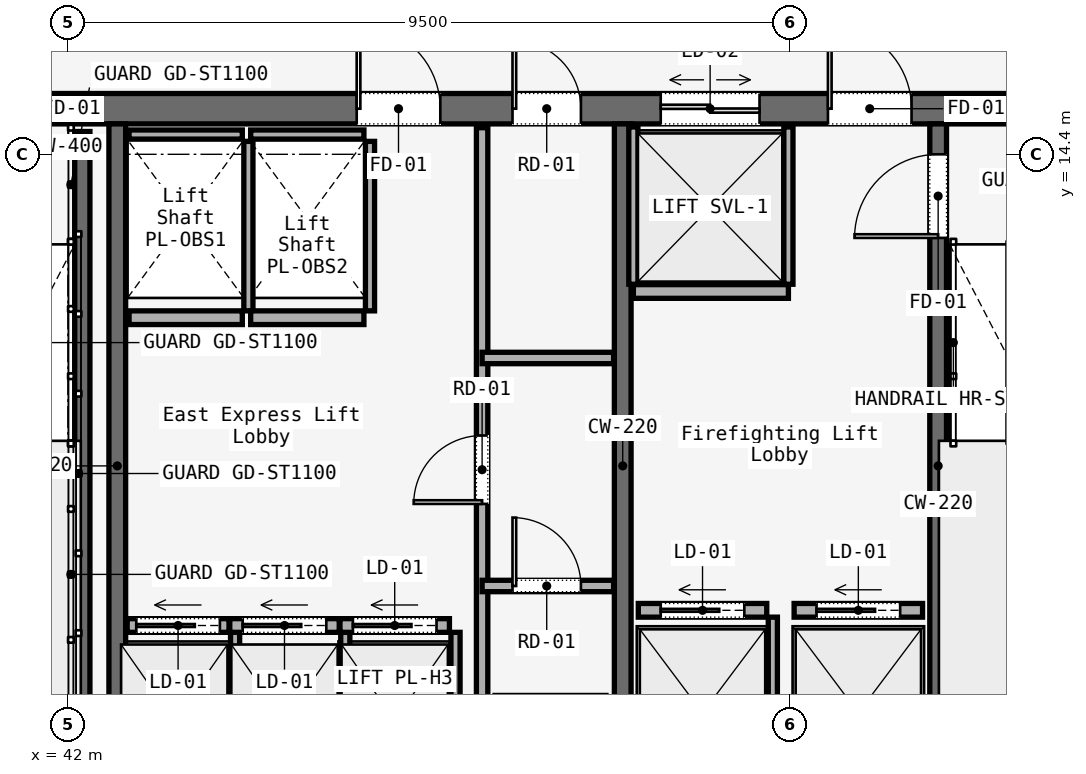
"""IFC4 building model, lengths in metres.
Left out: names, types, materials, properties, quantities, classifications, styles, units other than length and angle.
Written with IfcOpenShell. Run it as: python <this file> out.ifc"""

import sys

from ifc_helpers import new_model, si_unit, direction, frame, frame_2d, origin, place, context, subcontext, project, spatial, rectangle, extrude, element, fill, save


model = new_model("IFC4")
c1 = context("Model", 3, precision=1e-05, world=origin(), true_north=direction((0.0, 1.0)))
c2 = subcontext(c1, "Body", "Model", "MODEL_VIEW")
j1 = project(units=[si_unit("LENGTHUNIT", "METRE"), si_unit("PLANEANGLEUNIT", "RADIAN")], contexts=[c1])
p1 = place(None, origin())
s1 = spatial("IfcSite", under=j1, at=p1, CompositionType="ELEMENT")
p2 = place(p1, origin())
s2 = spatial("IfcBuilding", under=s1, at=p2, CompositionType="ELEMENT")
p3 = place(p2, frame((0.0, 0.0, 229.4)))
s3 = spatial("IfcBuildingStorey", under=s2, at=p3, CompositionType="ELEMENT", Elevation=229.4)
p4 = place(p3, frame((26.45, 15.0, 0.0), z_axis=(0.0, 0.0, 1.0), x_axis=(1.0, 0.0, 0.0)))
e1 = element("IfcWall", 1, at=p4, inside=s3, PredefinedType="SOLIDWALL", context=c2, shape_type="SweptSolid", body=[
    extrude(rectangle(XDim=31.1, YDim=0.4, at=frame_2d((15.55, 0.0))), origin(), (0.0, 0.0, 1.0), 3.58),
])
p5 = place(p4, frame((1.65, 0.0, 0.0)))
e2 = element("IfcOpeningElement", 2, at=p5, cuts=e1, PredefinedType="OPENING", context=c2, shape_type="SweptSolid", body=[
    extrude(rectangle(XDim=1.1, YDim=2.2, at=frame_2d((0.55, 1.1))), frame((0.0, 0.2, 0.0), z_axis=(0.0, -1.0, 0.0), x_axis=(1.0, 0.0, 0.0)), (0.0, 0.0, 1.0), 0.4),
])
p6 = place(p4, frame((13.65, 0.0, 0.0)))
e3 = element("IfcOpeningElement", 3, at=p6, cuts=e1, PredefinedType="OPENING", context=c2, shape_type="SweptSolid", body=[
    extrude(rectangle(XDim=1.1, YDim=2.2, at=frame_2d((0.55, 1.1))), frame((0.0, 0.2, 0.0), z_axis=(0.0, -1.0, 0.0), x_axis=(1.0, 0.0, 0.0)), (0.0, 0.0, 1.0), 0.4),
])
p7 = place(p4, frame((25.55, 0.0, 0.0)))
e4 = element("IfcOpeningElement", 4, at=p7, cuts=e1, PredefinedType="OPENING", context=c2, shape_type="SweptSolid", body=[
    extrude(rectangle(XDim=1.1, YDim=2.2, at=frame_2d((0.55, 1.1))), frame((0.0, 0.2, 0.0), z_axis=(0.0, -1.0, 0.0), x_axis=(1.0, 0.0, 0.0)), (0.0, 0.0, 1.0), 0.4),
])
p8 = place(p4, frame((19.35, 0.0, 0.0)))
e5 = element("IfcOpeningElement", 5, at=p8, cuts=e1, PredefinedType="OPENING", context=c2, shape_type="SweptSolid", body=[
    extrude(rectangle(XDim=1.1, YDim=2.2, at=frame_2d((0.55, 1.1))), frame((0.0, 0.2, 0.0), z_axis=(0.0, -1.0, 0.0), x_axis=(1.0, 0.0, 0.0)), (0.0, 0.0, 1.0), 0.4),
])
p9 = place(p4, frame((21.4, 0.0, 0.0)))
e6 = element("IfcOpeningElement", 6, at=p9, cuts=e1, PredefinedType="OPENING", context=c2, shape_type="SweptSolid", body=[
    extrude(rectangle(XDim=0.9, YDim=2.1, at=frame_2d((0.45, 1.05))), frame((0.0, 0.2, 0.0), z_axis=(0.0, -1.0, 0.0), x_axis=(1.0, 0.0, 0.0)), (0.0, 0.0, 1.0), 0.4),
])
p10 = place(p4, frame((5.54, 0.0, 0.0)))
e7 = element("IfcOpeningElement", 7, at=p10, cuts=e1, PredefinedType="OPENING", context=c2, shape_type="SweptSolid", body=[
    extrude(rectangle(XDim=0.95, YDim=2.2, at=frame_2d((0.475, 1.1))), frame((0.0, 0.2, 0.0), z_axis=(0.0, -1.0, 0.0), x_axis=(1.0, 0.0, 0.0)), (0.0, 0.0, 1.0), 0.4),
])
p11 = place(p4, frame((9.49, 0.0, 0.0)))
e8 = element("IfcOpeningElement", 8, at=p11, cuts=e1, PredefinedType="OPENING", context=c2, shape_type="SweptSolid", body=[
    extrude(rectangle(XDim=0.95, YDim=2.2, at=frame_2d((0.475, 1.1))), frame((0.0, 0.2, 0.0), z_axis=(0.0, -1.0, 0.0), x_axis=(1.0, 0.0, 0.0)), (0.0, 0.0, 1.0), 0.4),
])
p12 = place(p4, frame((23.35, 0.0, 0.0)))
e9 = element("IfcOpeningElement", 9, at=p12, cuts=e1, PredefinedType="OPENING", context=c2, shape_type="SweptSolid", body=[
    extrude(rectangle(XDim=1.3, YDim=2.3, at=frame_2d((0.65, 1.15))), frame((0.0, 0.2, 0.0), z_axis=(0.0, -1.0, 0.0), x_axis=(1.0, 0.0, 0.0)), (0.0, 0.0, 1.0), 0.4),
])
for number, where, z_axis, x_axis in (
    (10, (42.65, 5.8, 0.0), (0.0, 0.0, 1.0), (0.0, 1.0, 0.0)),
    (11, (49.3, 5.8, 0.0), (0.0, 0.0, 1.0), (0.0, 1.0, 0.0)),
):
    element("IfcWall", number, at=place(p3, frame(where, z_axis=z_axis, x_axis=x_axis)), inside=s3, PredefinedType="SOLIDWALL", context=c2, shape_type="SweptSolid", body=[
        extrude(rectangle(XDim=9.0, YDim=0.22, at=frame_2d((4.5, 0.0))), origin(), (0.0, 0.0, 1.0), 3.58),
    ])
p13 = place(p3, frame((53.45, 5.8, 0.0), z_axis=(0.0, 0.0, 1.0), x_axis=(0.0, 1.0, 0.0)))
e12 = element("IfcWall", 12, at=p13, inside=s3, PredefinedType="SOLIDWALL", context=c2, shape_type="SweptSolid", body=[
    extrude(rectangle(XDim=9.0, YDim=0.22, at=frame_2d((4.5, 0.0))), origin(), (0.0, 0.0, 1.0), 3.58),
])
p14 = place(p13, frame((7.5, 0.0, 0.0)))
e13 = element("IfcOpeningElement", 13, at=p14, cuts=e12, PredefinedType="OPENING", context=c2, shape_type="SweptSolid", body=[
    extrude(rectangle(XDim=1.1, YDim=2.2, at=frame_2d((0.55, 1.1))), frame((0.0, 0.11, 0.0), z_axis=(0.0, -1.0, 0.0), x_axis=(1.0, 0.0, 0.0)), (0.0, 0.0, 1.0), 0.22),
])
p15 = place(p3, frame((42.19, 14.7, 0.0), z_axis=(0.0, 0.0, 1.0), x_axis=(0.0, -1.0, 0.0)))
e14 = element("IfcWall", 14, at=p15, inside=s3, PredefinedType="SOLIDWALL", context=c2, shape_type="SweptSolid", body=[
    extrude(rectangle(XDim=7.65, YDim=0.2, at=frame_2d((3.825, 0.0))), origin(), (0.0, 0.0, 1.0), 3.8),
])
p16 = place(p3, frame((47.45, 5.9, 0.0), z_axis=(0.0, 0.0, 1.0), x_axis=(0.0, 1.0, 0.0)))
e15 = element("IfcWall", 15, at=p16, inside=s3, PredefinedType="PARTITIONING", context=c2, shape_type="SweptSolid", body=[
    extrude(rectangle(XDim=8.85, YDim=0.15, at=frame_2d((4.425, 0.0))), origin(), (0.0, 0.0, 1.0), 3.01),
])
p17 = place(p16, frame((3.9, 0.0, 0.0)))
e16 = element("IfcOpeningElement", 16, at=p17, cuts=e15, PredefinedType="OPENING", context=c2, shape_type="SweptSolid", body=[
    extrude(rectangle(XDim=0.9, YDim=2.1, at=frame_2d((0.45, 1.05))), frame((0.0, 0.075, 0.0), z_axis=(0.0, -1.0, 0.0), x_axis=(1.0, 0.0, 0.0)), (0.0, 0.0, 1.0), 0.15),
])
p18 = place(p3, frame((47.45, 8.72, 0.0), z_axis=(0.0, 0.0, 1.0), x_axis=(1.0, 0.0, 0.0)))
e17 = element("IfcWall", 17, at=p18, inside=s3, PredefinedType="PARTITIONING", context=c2, shape_type="SweptSolid", body=[
    extrude(rectangle(XDim=1.73, YDim=0.15, at=frame_2d((0.865, 0.0))), origin(), (0.0, 0.0, 1.0), 3.01),
])
p19 = place(p18, frame((0.4, 0.0, 0.0)))
e18 = element("IfcOpeningElement", 18, at=p19, cuts=e17, PredefinedType="OPENING", context=c2, shape_type="SweptSolid", body=[
    extrude(rectangle(XDim=0.9, YDim=2.1, at=frame_2d((0.45, 1.05))), frame((0.0, 0.075, 0.0), z_axis=(0.0, -1.0, 0.0), x_axis=(1.0, 0.0, 0.0)), (0.0, 0.0, 1.0), 0.15),
])
p20 = place(p3, frame((47.45, 11.72, 0.0), z_axis=(0.0, 0.0, 1.0), x_axis=(1.0, 0.0, 0.0)))
e19 = element("IfcWall", 19, at=p20, inside=s3, PredefinedType="PARTITIONING", context=c2, shape_type="SweptSolid", body=[
    extrude(rectangle(XDim=1.73, YDim=0.15, at=frame_2d((0.865, 0.0))), origin(), (0.0, 0.0, 1.0), 3.01),
])
p21 = place(p3, frame((42.78, 8.2, 0.0), z_axis=(0.0, 0.0, 1.0), x_axis=(1.0, 0.0, 0.0)))
e20 = element("IfcWall", 20, at=p21, inside=s3, PredefinedType="SOLIDWALL", context=c2, shape_type="SweptSolid", body=[
    extrude(rectangle(XDim=1.34, YDim=0.18, at=frame_2d((0.67, 0.0))), origin(), (0.0, 0.0, 1.0), 3.01),
])
p22 = place(p21, frame((0.12, 0.0, 0.0)))
e21 = element("IfcOpeningElement", 21, at=p22, cuts=e20, PredefinedType="OPENING", context=c2, shape_type="SweptSolid", body=[
    extrude(rectangle(XDim=1.1, YDim=2.2, at=frame_2d((0.55, 1.1))), frame((0.0, 0.09, 0.0), z_axis=(0.0, -1.0, 0.0), x_axis=(1.0, 0.0, 0.0)), (0.0, 0.0, 1.0), 0.18),
])
p23 = place(p3, frame((44.2, 5.93, 0.0), z_axis=(0.0, 0.0, 1.0), x_axis=(0.0, 1.0, 0.0)))
e22 = element("IfcWall", 22, at=p23, inside=s3, PredefinedType="SOLIDWALL", context=c2, shape_type="SweptSolid", body=[
    extrude(rectangle(XDim=2.18, YDim=0.12, at=frame_2d((1.09, 0.0))), origin(), (0.0, 0.0, 1.0), 3.01),
])
p24 = place(p3, frame((44.13, 8.2, 0.0), z_axis=(0.0, 0.0, 1.0), x_axis=(1.0, 0.0, 0.0)))
e23 = element("IfcWall", 23, at=p24, inside=s3, PredefinedType="SOLIDWALL", context=c2, shape_type="SweptSolid", body=[
    extrude(rectangle(XDim=1.44, YDim=0.18, at=frame_2d((0.72, 0.0))), origin(), (0.0, 0.0, 1.0), 3.01),
])
p25 = place(p24, frame((0.17, 0.0, 0.0)))
e24 = element("IfcOpeningElement", 24, at=p25, cuts=e23, PredefinedType="OPENING", context=c2, shape_type="SweptSolid", body=[
    extrude(rectangle(XDim=1.1, YDim=2.2, at=frame_2d((0.55, 1.1))), frame((0.0, 0.09, 0.0), z_axis=(0.0, -1.0, 0.0), x_axis=(1.0, 0.0, 0.0)), (0.0, 0.0, 1.0), 0.18),
])
p26 = place(p3, frame((45.65, 5.93, 0.0), z_axis=(0.0, 0.0, 1.0), x_axis=(0.0, 1.0, 0.0)))
e25 = element("IfcWall", 25, at=p26, inside=s3, PredefinedType="SOLIDWALL", context=c2, shape_type="SweptSolid", body=[
    extrude(rectangle(XDim=2.18, YDim=0.12, at=frame_2d((1.09, 0.0))), origin(), (0.0, 0.0, 1.0), 3.01),
])
p27 = place(p3, frame((45.58, 8.2, 0.0), z_axis=(0.0, 0.0, 1.0), x_axis=(1.0, 0.0, 0.0)))
e26 = element("IfcWall", 26, at=p27, inside=s3, PredefinedType="SOLIDWALL", context=c2, shape_type="SweptSolid", body=[
    extrude(rectangle(XDim=1.44, YDim=0.18, at=frame_2d((0.72, 0.0))), origin(), (0.0, 0.0, 1.0), 3.01),
])
p28 = place(p27, frame((0.17, 0.0, 0.0)))
e27 = element("IfcOpeningElement", 27, at=p28, cuts=e26, PredefinedType="OPENING", context=c2, shape_type="SweptSolid", body=[
    extrude(rectangle(XDim=1.1, YDim=2.2, at=frame_2d((0.55, 1.1))), frame((0.0, 0.09, 0.0), z_axis=(0.0, -1.0, 0.0), x_axis=(1.0, 0.0, 0.0)), (0.0, 0.0, 1.0), 0.18),
])
p29 = place(p3, frame((47.1, 5.93, 0.0), z_axis=(0.0, 0.0, 1.0), x_axis=(0.0, 1.0, 0.0)))
e28 = element("IfcWall", 28, at=p29, inside=s3, PredefinedType="SOLIDWALL", context=c2, shape_type="SweptSolid", body=[
    extrude(rectangle(XDim=2.18, YDim=0.12, at=frame_2d((1.09, 0.0))), origin(), (0.0, 0.0, 1.0), 3.01),
])
p30 = place(p3, frame((42.805, 12.25, 0.0), z_axis=(0.0, 0.0, 1.0), x_axis=(1.0, 0.0, 0.0)))
e29 = element("IfcWall", 29, at=p30, inside=s3, PredefinedType="SOLIDWALL", context=c2, shape_type="SweptSolid", body=[
    extrude(rectangle(XDim=1.49, YDim=0.18, at=frame_2d((0.745, 0.0))), origin(), (0.0, 0.0, 1.0), 3.01),
])
p31 = place(p3, frame((42.805, 14.66, 0.0), z_axis=(0.0, 0.0, 1.0), x_axis=(1.0, 0.0, 0.0)))
e30 = element("IfcWall", 30, at=p31, inside=s3, PredefinedType="SOLIDWALL", context=c2, shape_type="SweptSolid", body=[
    extrude(rectangle(XDim=1.49, YDim=0.12, at=frame_2d((0.745, 0.0))), origin(), (0.0, 0.0, 1.0), 3.01),
])
p32 = place(p3, frame((44.375, 12.34, 0.0), z_axis=(0.0, 0.0, 1.0), x_axis=(0.0, 1.0, 0.0)))
e31 = element("IfcWall", 31, at=p32, inside=s3, PredefinedType="SOLIDWALL", context=c2, shape_type="SweptSolid", body=[
    extrude(rectangle(XDim=2.23, YDim=0.12, at=frame_2d((1.115, 0.0))), origin(), (0.0, 0.0, 1.0), 3.01),
])
p33 = place(p3, frame((44.405, 12.25, 0.0), z_axis=(0.0, 0.0, 1.0), x_axis=(1.0, 0.0, 0.0)))
e32 = element("IfcWall", 32, at=p33, inside=s3, PredefinedType="SOLIDWALL", context=c2, shape_type="SweptSolid", body=[
    extrude(rectangle(XDim=1.49, YDim=0.18, at=frame_2d((0.745, 0.0))), origin(), (0.0, 0.0, 1.0), 3.01),
])
p34 = place(p3, frame((44.405, 14.66, 0.0), z_axis=(0.0, 0.0, 1.0), x_axis=(1.0, 0.0, 0.0)))
e33 = element("IfcWall", 33, at=p34, inside=s3, PredefinedType="SOLIDWALL", context=c2, shape_type="SweptSolid", body=[
    extrude(rectangle(XDim=1.49, YDim=0.12, at=frame_2d((0.745, 0.0))), origin(), (0.0, 0.0, 1.0), 3.01),
])
p35 = place(p3, frame((45.975, 12.34, 0.0), z_axis=(0.0, 0.0, 1.0), x_axis=(0.0, 1.0, 0.0)))
e34 = element("IfcWall", 34, at=p35, inside=s3, PredefinedType="SOLIDWALL", context=c2, shape_type="SweptSolid", body=[
    extrude(rectangle(XDim=2.23, YDim=0.12, at=frame_2d((1.115, 0.0))), origin(), (0.0, 0.0, 1.0), 3.01),
])
p36 = place(p3, frame((49.505, 8.4, 0.0), z_axis=(0.0, 0.0, 1.0), x_axis=(1.0, 0.0, 0.0)))
e35 = element("IfcWall", 35, at=p36, inside=s3, PredefinedType="SOLIDWALL", context=c2, shape_type="SweptSolid", body=[
    extrude(rectangle(XDim=1.69, YDim=0.18, at=frame_2d((0.845, 0.0))), origin(), (0.0, 0.0, 1.0), 3.01),
])
p37 = place(p36, frame((0.295, 0.0, 0.0)))
e36 = element("IfcOpeningElement", 36, at=p37, cuts=e35, PredefinedType="OPENING", context=c2, shape_type="SweptSolid", body=[
    extrude(rectangle(XDim=1.1, YDim=2.2, at=frame_2d((0.55, 1.1))), frame((0.0, 0.09, 0.0), z_axis=(0.0, -1.0, 0.0), x_axis=(1.0, 0.0, 0.0)), (0.0, 0.0, 1.0), 0.18),
])
p38 = place(p3, frame((51.275, 5.93, 0.0), z_axis=(0.0, 0.0, 1.0), x_axis=(0.0, 1.0, 0.0)))
e37 = element("IfcWall", 37, at=p38, inside=s3, PredefinedType="SOLIDWALL", context=c2, shape_type="SweptSolid", body=[
    extrude(rectangle(XDim=2.38, YDim=0.12, at=frame_2d((1.19, 0.0))), origin(), (0.0, 0.0, 1.0), 3.01),
])
p39 = place(p3, frame((51.555, 8.4, 0.0), z_axis=(0.0, 0.0, 1.0), x_axis=(1.0, 0.0, 0.0)))
e38 = element("IfcWall", 38, at=p39, inside=s3, PredefinedType="SOLIDWALL", context=c2, shape_type="SweptSolid", body=[
    extrude(rectangle(XDim=1.69, YDim=0.18, at=frame_2d((0.845, 0.0))), origin(), (0.0, 0.0, 1.0), 3.01),
])
p40 = place(p39, frame((0.295, 0.0, 0.0)))
e39 = element("IfcOpeningElement", 39, at=p40, cuts=e38, PredefinedType="OPENING", context=c2, shape_type="SweptSolid", body=[
    extrude(rectangle(XDim=1.1, YDim=2.2, at=frame_2d((0.55, 1.1))), frame((0.0, 0.09, 0.0), z_axis=(0.0, -1.0, 0.0), x_axis=(1.0, 0.0, 0.0)), (0.0, 0.0, 1.0), 0.18),
])
p41 = place(p3, frame((49.44, 12.595, 0.0), z_axis=(0.0, 0.0, 1.0), x_axis=(1.0, 0.0, 0.0)))
e40 = element("IfcWall", 40, at=p41, inside=s3, PredefinedType="SOLIDWALL", context=c2, shape_type="SweptSolid", body=[
    extrude(rectangle(XDim=2.04, YDim=0.18, at=frame_2d((1.02, 0.0))), origin(), (0.0, 0.0, 1.0), 3.01),
])
for number, where, z_axis, x_axis in (
    (41, (49.44, 12.69, 0.0), (0.0, 0.0, 1.0), (0.0, 1.0, 0.0)),
    (42, (51.48, 12.69, 0.0), (0.0, 0.0, 1.0), (0.0, 1.0, 0.0)),
):
    element("IfcWall", number, at=place(p3, frame(where, z_axis=z_axis, x_axis=x_axis)), inside=s3, PredefinedType="SOLIDWALL", context=c2, shape_type="SweptSolid", body=[
        extrude(rectangle(XDim=2.07, YDim=0.12, at=frame_2d((1.035, 0.0))), origin(), (0.0, 0.0, 1.0), 3.01),
    ])
p42 = place(p7, origin())
e43 = element("IfcDoor", 43, at=p42, inside=s3, OperationType="SINGLE_SWING_RIGHT", PredefinedType="DOOR", context=c2, shape_type="SweptSolid", body=[
    extrude(rectangle(XDim=1.1, YDim=2.2, at=frame_2d((0.55, 1.1))), frame((0.0, 0.025, 0.0), z_axis=(0.0, -1.0, 0.0), x_axis=(1.0, 0.0, 0.0)), (0.0, 0.0, 1.0), 0.05),
])
fill(e4, e43)
p43 = place(p8, origin())
e44 = element("IfcDoor", 44, at=p43, inside=s3, OperationType="SINGLE_SWING_LEFT", PredefinedType="DOOR", context=c2, shape_type="SweptSolid", body=[
    extrude(rectangle(XDim=1.1, YDim=2.2, at=frame_2d((0.55, 1.1))), frame((0.0, 0.025, 0.0), z_axis=(0.0, -1.0, 0.0), x_axis=(1.0, 0.0, 0.0)), (0.0, 0.0, 1.0), 0.05),
])
fill(e5, e44)
p44 = place(p9, origin())
e45 = element("IfcDoor", 45, at=p44, inside=s3, OperationType="SINGLE_SWING_LEFT", PredefinedType="DOOR", context=c2, shape_type="SweptSolid", body=[
    extrude(rectangle(XDim=0.9, YDim=2.1, at=frame_2d((0.45, 1.05))), frame((0.0, 0.025, 0.0), z_axis=(0.0, -1.0, 0.0), x_axis=(1.0, 0.0, 0.0)), (0.0, 0.0, 1.0), 0.05),
])
fill(e6, e45)
p45 = place(p14, origin())
e46 = element("IfcDoor", 46, at=p45, inside=s3, OperationType="SINGLE_SWING_LEFT", PredefinedType="DOOR", context=c2, shape_type="SweptSolid", body=[
    extrude(rectangle(XDim=1.1, YDim=2.2, at=frame_2d((0.55, 1.1))), frame((0.0, 0.025, 0.0), z_axis=(0.0, -1.0, 0.0), x_axis=(1.0, 0.0, 0.0)), (0.0, 0.0, 1.0), 0.05),
])
fill(e13, e46)
p46 = place(p17, origin())
e47 = element("IfcDoor", 47, at=p46, inside=s3, OperationType="SINGLE_SWING_LEFT", PredefinedType="DOOR", context=c2, shape_type="SweptSolid", body=[
    extrude(rectangle(XDim=0.9, YDim=2.1, at=frame_2d((0.45, 1.05))), frame((0.0, 0.025, 0.0), z_axis=(0.0, -1.0, 0.0), x_axis=(1.0, 0.0, 0.0)), (0.0, 0.0, 1.0), 0.05),
])
fill(e16, e47)
p47 = place(p19, origin())
e48 = element("IfcDoor", 48, at=p47, inside=s3, OperationType="SINGLE_SWING_RIGHT", PredefinedType="DOOR", context=c2, shape_type="SweptSolid", body=[
    extrude(rectangle(XDim=0.9, YDim=2.1, at=frame_2d((0.45, 1.05))), frame((0.0, 0.025, 0.0), z_axis=(0.0, -1.0, 0.0), x_axis=(1.0, 0.0, 0.0)), (0.0, 0.0, 1.0), 0.05),
])
fill(e18, e48)
p48 = place(p22, origin())
e49 = element("IfcDoor", 49, at=p48, inside=s3, OperationType="SLIDING_TO_LEFT", PredefinedType="DOOR", context=c2, shape_type="SweptSolid", body=[
    extrude(rectangle(XDim=1.1, YDim=2.2, at=frame_2d((0.55, 1.1))), frame((0.0, 0.025, 0.0), z_axis=(0.0, -1.0, 0.0), x_axis=(1.0, 0.0, 0.0)), (0.0, 0.0, 1.0), 0.05),
])
fill(e21, e49)
p49 = place(p25, origin())
e50 = element("IfcDoor", 50, at=p49, inside=s3, OperationType="SLIDING_TO_LEFT", PredefinedType="DOOR", context=c2, shape_type="SweptSolid", body=[
    extrude(rectangle(XDim=1.1, YDim=2.2, at=frame_2d((0.55, 1.1))), frame((0.0, 0.025, 0.0), z_axis=(0.0, -1.0, 0.0), x_axis=(1.0, 0.0, 0.0)), (0.0, 0.0, 1.0), 0.05),
])
fill(e24, e50)
p50 = place(p28, origin())
e51 = element("IfcDoor", 51, at=p50, inside=s3, OperationType="SLIDING_TO_LEFT", PredefinedType="DOOR", context=c2, shape_type="SweptSolid", body=[
    extrude(rectangle(XDim=1.1, YDim=2.2, at=frame_2d((0.55, 1.1))), frame((0.0, 0.025, 0.0), z_axis=(0.0, -1.0, 0.0), x_axis=(1.0, 0.0, 0.0)), (0.0, 0.0, 1.0), 0.05),
])
fill(e27, e51)
p51 = place(p37, origin())
e52 = element("IfcDoor", 52, at=p51, inside=s3, OperationType="SLIDING_TO_LEFT", PredefinedType="DOOR", context=c2, shape_type="SweptSolid", body=[
    extrude(rectangle(XDim=1.1, YDim=2.2, at=frame_2d((0.55, 1.1))), frame((0.0, 0.025, 0.0), z_axis=(0.0, -1.0, 0.0), x_axis=(1.0, 0.0, 0.0)), (0.0, 0.0, 1.0), 0.05),
])
fill(e36, e52)
p52 = place(p40, origin())
e53 = element("IfcDoor", 53, at=p52, inside=s3, OperationType="SLIDING_TO_LEFT", PredefinedType="DOOR", context=c2, shape_type="SweptSolid", body=[
    extrude(rectangle(XDim=1.1, YDim=2.2, at=frame_2d((0.55, 1.1))), frame((0.0, 0.025, 0.0), z_axis=(0.0, -1.0, 0.0), x_axis=(1.0, 0.0, 0.0)), (0.0, 0.0, 1.0), 0.05),
])
fill(e39, e53)
p53 = place(p12, origin())
e54 = element("IfcDoor", 54, at=p53, inside=s3, OperationType="DOUBLE_DOOR_SLIDING", PredefinedType="DOOR", context=c2, shape_type="SweptSolid", body=[
    extrude(rectangle(XDim=1.3, YDim=2.3, at=frame_2d((0.65, 1.15))), frame((0.0, 0.025, 0.0), z_axis=(0.0, -1.0, 0.0), x_axis=(1.0, 0.0, 0.0)), (0.0, 0.0, 1.0), 0.05),
])
fill(e9, e54)
save(model, sys.argv[1])
